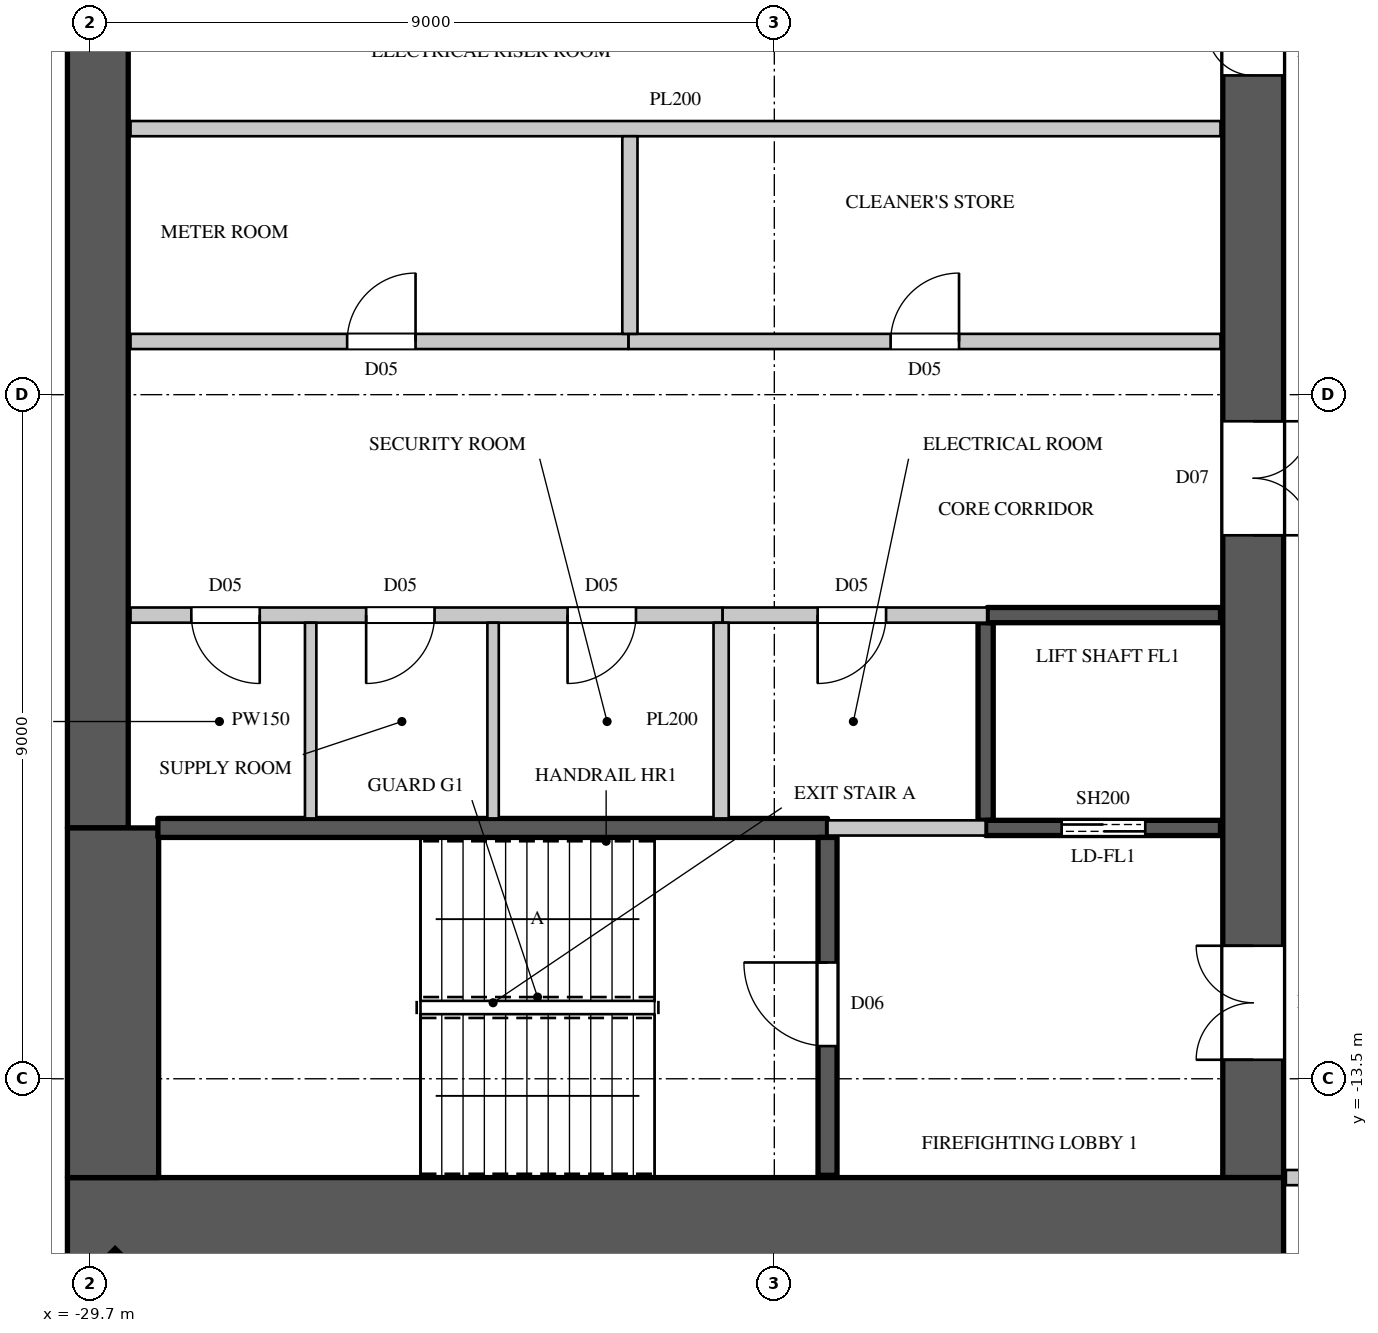
"""IFC4 building model, lengths in metres.
Left out: names, types, materials, properties, quantities, classifications, styles, units other than length and angle.
Written with IfcOpenShell. Run it as: python <this file> out.ifc"""

import sys

from ifc_helpers import new_model, si_unit, direction, frame, frame_2d, origin, origin_2d, place, context, subcontext, project, spatial, rectangle, extrude, element, fill, save


model = new_model("IFC4")
c1 = context("Model", 3, precision=1e-05, world=origin(), true_north=direction((0.0, 1.0)))
c2 = subcontext(c1, "Body", "Model", "MODEL_VIEW")
j1 = project(units=[si_unit("LENGTHUNIT", "METRE"), si_unit("PLANEANGLEUNIT", "RADIAN")], contexts=[c1])
p1 = place(None, origin())
s1 = spatial("IfcSite", under=j1, at=p1, CompositionType="ELEMENT")
p2 = place(p1, origin())
s2 = spatial("IfcBuilding", under=s1, at=p2, CompositionType="ELEMENT")
p3 = place(p2, frame((0.0, 0.0, 164.6)))
s3 = spatial("IfcBuildingStorey", under=s2, at=p3, CompositionType="ELEMENT", Elevation=164.6)
p4 = place(p3, frame((-29.443, -16.443, 0.0), z_axis=(0.0, 0.0, 1.0), x_axis=(0.707106781187, -0.707106781187, 0.0)))
e1 = element("IfcColumn", 1, at=p4, inside=s3, PredefinedType="COLUMN", context=c2, shape_type="SweptSolid", body=[
    extrude(rectangle(XDim=0.9, YDim=1.1, at=origin_2d()), origin(), (0.0, 0.0, 1.0), 4.1),
])
p5 = place(p3, frame((-30.0, -15.4, 0.0), z_axis=(0.0, 0.0, 1.0), x_axis=(1.0, 0.0, 0.0)))
e2 = element("IfcWall", 2, at=p5, inside=s3, PredefinedType="SHEAR", context=c2, shape_type="SweptSolid", body=[
    extrude(rectangle(XDim=16.0, YDim=1.2, at=frame_2d((8.0, 0.0))), origin(), (0.0, 0.0, 1.0), 4.1),
])
p6 = place(p3, frame((-14.4, -14.8, 0.0), z_axis=(0.0, 0.0, 1.0), x_axis=(0.0, 1.0, 0.0)))
e3 = element("IfcWall", 3, at=p6, inside=s3, PredefinedType="SHEAR", context=c2, shape_type="SweptSolid", body=[
    extrude(rectangle(XDim=29.6, YDim=0.8, at=frame_2d((14.8, 0.0))), origin(), (0.0, 0.0, 1.0), 4.1),
])
p7 = place(p6, frame((1.55, 0.0, 0.0)))
e4 = element("IfcOpeningElement", 4, at=p7, cuts=e3, PredefinedType="OPENING", context=c2, shape_type="SweptSolid", body=[
    extrude(rectangle(XDim=1.5, YDim=2.4, at=frame_2d((0.75, 1.2))), frame((0.0, 0.41, 0.0), z_axis=(0.0, -1.0, 0.0), x_axis=(1.0, 0.0, 0.0)), (0.0, 0.0, 1.0), 0.82),
])
p8 = place(p6, frame((26.55, 0.0, 0.0)))
e5 = element("IfcOpeningElement", 5, at=p8, cuts=e3, PredefinedType="OPENING", context=c2, shape_type="SweptSolid", body=[
    extrude(rectangle(XDim=1.5, YDim=2.4, at=frame_2d((0.75, 1.2))), frame((0.0, 0.41, 0.0), z_axis=(0.0, -1.0, 0.0), x_axis=(1.0, 0.0, 0.0)), (0.0, 0.0, 1.0), 0.82),
])
p9 = place(p6, frame((8.45, 0.0, 0.0)))
e6 = element("IfcOpeningElement", 6, at=p9, cuts=e3, PredefinedType="OPENING", context=c2, shape_type="SweptSolid", body=[
    extrude(rectangle(XDim=1.5, YDim=2.4, at=frame_2d((0.75, 1.2))), frame((0.0, 0.41, 0.0), z_axis=(0.0, -1.0, 0.0), x_axis=(1.0, 0.0, 0.0)), (0.0, 0.0, 1.0), 0.82),
])
p10 = place(p6, frame((19.65, 0.0, 0.0)))
e7 = element("IfcOpeningElement", 7, at=p10, cuts=e3, PredefinedType="OPENING", context=c2, shape_type="SweptSolid", body=[
    extrude(rectangle(XDim=1.5, YDim=2.4, at=frame_2d((0.75, 1.2))), frame((0.0, 0.41, 0.0), z_axis=(0.0, -1.0, 0.0), x_axis=(1.0, 0.0, 0.0)), (0.0, 0.0, 1.0), 0.82),
])
p11 = place(p6, frame((14.5, 0.0, 0.0)))
e8 = element("IfcOpeningElement", 8, at=p11, cuts=e3, PredefinedType="OPENING", context=c2, shape_type="SweptSolid", body=[
    extrude(rectangle(XDim=0.6, YDim=2.0, at=frame_2d((0.3, 1.0))), frame((0.0, 0.41, 0.0), z_axis=(0.0, -1.0, 0.0), x_axis=(1.0, 0.0, 0.0)), (0.0, 0.0, 1.0), 0.82),
])
p12 = place(p3, frame((-29.6, -10.2, 0.0), z_axis=(0.0, 0.0, 1.0), x_axis=(0.0, 1.0, 0.0)))
e9 = element("IfcWall", 9, at=p12, inside=s3, PredefinedType="SHEAR", context=c2, shape_type="SweptSolid", body=[
    extrude(rectangle(XDim=20.4, YDim=0.8, at=frame_2d((10.2, 0.0))), origin(), (0.0, 0.0, 1.0), 4.1),
])
p13 = place(p3, frame((-29.4, -14.8, 0.0), z_axis=(0.0, 0.0, 1.0), x_axis=(0.0, 1.0, 0.0)))
e10 = element("IfcWall", 10, at=p13, inside=s3, PredefinedType="SHEAR", context=c2, shape_type="SweptSolid", body=[
    extrude(rectangle(XDim=4.6, YDim=1.2, at=frame_2d((2.3, 0.0))), origin(), (0.0, 0.0, 1.0), 4.1),
])
p14 = place(p3, frame((-29.17, -7.4, 0.0), z_axis=(0.0, 0.0, 1.0), x_axis=(1.0, 0.0, 0.0)))
e11 = element("IfcWall", 11, at=p14, inside=s3, PredefinedType="PARTITIONING", context=c2, shape_type="SweptSolid", body=[
    extrude(rectangle(XDim=7.79, YDim=0.2, at=frame_2d((3.895, 0.0))), origin(), (0.0, 0.0, 1.0), 3.8),
])
p15 = place(p14, frame((0.8, 0.0, 0.0)))
e12 = element("IfcOpeningElement", 12, at=p15, cuts=e11, PredefinedType="OPENING", context=c2, shape_type="SweptSolid", body=[
    extrude(rectangle(XDim=0.9, YDim=2.2, at=frame_2d((0.45, 1.1))), frame((0.0, 0.11, 0.0), z_axis=(0.0, -1.0, 0.0), x_axis=(1.0, 0.0, 0.0)), (0.0, 0.0, 1.0), 0.22),
])
p16 = place(p14, frame((3.1, 0.0, 0.0)))
e13 = element("IfcOpeningElement", 13, at=p16, cuts=e11, PredefinedType="OPENING", context=c2, shape_type="SweptSolid", body=[
    extrude(rectangle(XDim=0.9, YDim=2.2, at=frame_2d((0.45, 1.1))), frame((0.0, 0.11, 0.0), z_axis=(0.0, -1.0, 0.0), x_axis=(1.0, 0.0, 0.0)), (0.0, 0.0, 1.0), 0.22),
])
p17 = place(p14, frame((5.75, 0.0, 0.0)))
e14 = element("IfcOpeningElement", 14, at=p17, cuts=e11, PredefinedType="OPENING", context=c2, shape_type="SweptSolid", body=[
    extrude(rectangle(XDim=0.9, YDim=2.2, at=frame_2d((0.45, 1.1))), frame((0.0, 0.11, 0.0), z_axis=(0.0, -1.0, 0.0), x_axis=(1.0, 0.0, 0.0)), (0.0, 0.0, 1.0), 0.22),
])
p18 = place(p3, frame((-22.62, -3.8, 0.0), z_axis=(0.0, 0.0, 1.0), x_axis=(1.0, 0.0, 0.0)))
e15 = element("IfcWall", 15, at=p18, inside=s3, PredefinedType="PARTITIONING", context=c2, shape_type="SweptSolid", body=[
    extrude(rectangle(XDim=7.79, YDim=0.2, at=frame_2d((3.895, 0.0))), origin(), (0.0, 0.0, 1.0), 3.8),
])
p19 = place(p18, frame((3.45, 0.0, 0.0)))
e16 = element("IfcOpeningElement", 16, at=p19, cuts=e15, PredefinedType="OPENING", context=c2, shape_type="SweptSolid", body=[
    extrude(rectangle(XDim=0.9, YDim=2.2, at=frame_2d((0.45, 1.1))), frame((0.0, 0.11, 0.0), z_axis=(0.0, -1.0, 0.0), x_axis=(1.0, 0.0, 0.0)), (0.0, 0.0, 1.0), 0.22),
])
p20 = place(p3, frame((-13.97, -14.8, 0.0), z_axis=(0.0, 0.0, 1.0), x_axis=(1.0, 0.0, 0.0)))
e17 = element("IfcWall", 17, at=p20, inside=s3, PredefinedType="PARTITIONING", context=c2, shape_type="SweptSolid", body=[
    extrude(rectangle(XDim=2.87, YDim=0.2, at=frame_2d((1.435, 0.0))), origin(), (0.0, 0.0, 1.0), 3.8),
])
for number, where, z_axis, x_axis in (
    (18, (-26.8, -10.075, 0.0), (0.0, 0.0, 1.0), (0.0, 1.0, 0.0)),
    (19, (-24.4, -10.075, 0.0), (0.0, 0.0, 1.0), (0.0, 1.0, 0.0)),
):
    element("IfcWall", number, at=place(p3, frame(where, z_axis=z_axis, x_axis=x_axis)), inside=s3, PredefinedType="PARTITIONING", context=c2, shape_type="SweptSolid", body=[
        extrude(rectangle(XDim=2.575, YDim=0.15, at=frame_2d((1.288, 0.0))), origin(), (0.0, 0.0, 1.0), 3.8),
    ])
p21 = place(p3, frame((-29.17, -3.8, 0.0), z_axis=(0.0, 0.0, 1.0), x_axis=(1.0, 0.0, 0.0)))
e20 = element("IfcWall", 20, at=p21, inside=s3, PredefinedType="PARTITIONING", context=c2, shape_type="SweptSolid", body=[
    extrude(rectangle(XDim=6.55, YDim=0.2, at=frame_2d((3.275, 0.0))), origin(), (0.0, 0.0, 1.0), 3.8),
])
p22 = place(p21, frame((2.85, 0.0, 0.0)))
e21 = element("IfcOpeningElement", 21, at=p22, cuts=e20, PredefinedType="OPENING", context=c2, shape_type="SweptSolid", body=[
    extrude(rectangle(XDim=0.9, YDim=2.2, at=frame_2d((0.45, 1.1))), frame((0.0, 0.11, 0.0), z_axis=(0.0, -1.0, 0.0), x_axis=(1.0, 0.0, 0.0)), (0.0, 0.0, 1.0), 0.22),
])
p23 = place(p3, frame((-29.17, -1.0, 0.0), z_axis=(0.0, 0.0, 1.0), x_axis=(1.0, 0.0, 0.0)))
e22 = element("IfcWall", 22, at=p23, inside=s3, PredefinedType="PARTITIONING", context=c2, shape_type="SweptSolid", body=[
    extrude(rectangle(XDim=14.34, YDim=0.2, at=frame_2d((7.17, 0.0))), origin(), (0.0, 0.0, 1.0), 3.8),
])
p24 = place(p3, frame((-22.6, -3.7, 0.0), z_axis=(0.0, 0.0, 1.0), x_axis=(0.0, 1.0, 0.0)))
e23 = element("IfcWall", 23, at=p24, inside=s3, PredefinedType="PARTITIONING", context=c2, shape_type="SweptSolid", body=[
    extrude(rectangle(XDim=2.6, YDim=0.2, at=frame_2d((1.3, 0.0))), origin(), (0.0, 0.0, 1.0), 3.8),
])
p25 = place(p3, frame((-21.38, -7.4, 0.0), z_axis=(0.0, 0.0, 1.0), x_axis=(1.0, 0.0, 0.0)))
e24 = element("IfcWall", 24, at=p25, inside=s3, PredefinedType="PARTITIONING", context=c2, shape_type="SweptSolid", body=[
    extrude(rectangle(XDim=3.48, YDim=0.2, at=frame_2d((1.74, 0.0))), origin(), (0.0, 0.0, 1.0), 3.8),
])
p26 = place(p25, frame((1.25, 0.0, 0.0)))
e25 = element("IfcOpeningElement", 25, at=p26, cuts=e24, PredefinedType="OPENING", context=c2, shape_type="SweptSolid", body=[
    extrude(rectangle(XDim=0.9, YDim=2.2, at=frame_2d((0.45, 1.1))), frame((0.0, 0.11, 0.0), z_axis=(0.0, -1.0, 0.0), x_axis=(1.0, 0.0, 0.0)), (0.0, 0.0, 1.0), 0.22),
])
p27 = place(p3, frame((-21.4, -10.075, 0.0), z_axis=(0.0, 0.0, 1.0), x_axis=(0.0, 1.0, 0.0)))
e26 = element("IfcWall", 26, at=p27, inside=s3, PredefinedType="PARTITIONING", context=c2, shape_type="SweptSolid", body=[
    extrude(rectangle(XDim=2.575, YDim=0.2, at=frame_2d((1.288, 0.0))), origin(), (0.0, 0.0, 1.0), 3.8),
])
p28 = place(p3, frame((-20.0, -10.2, 0.0), z_axis=(0.0, 0.0, 1.0), x_axis=(1.0, 0.0, 0.0)))
e27 = element("IfcWall", 27, at=p28, inside=s3, PredefinedType="PARTITIONING", context=c2, shape_type="SweptSolid", body=[
    extrude(rectangle(XDim=2.08, YDim=0.2, at=frame_2d((1.04, 0.0))), origin(), (0.0, 0.0, 1.0), 3.8),
])
p29 = place(p3, frame((-17.92, -10.1, 0.0), z_axis=(0.0, 0.0, 1.0), x_axis=(0.0, 1.0, 0.0)))
e28 = element("IfcWall", 28, at=p29, inside=s3, PredefinedType="SHEAR", context=c2, shape_type="SweptSolid", body=[
    extrude(rectangle(XDim=2.6, YDim=0.2, at=frame_2d((1.3, 0.0))), origin(), (0.0, 0.0, 1.0), 3.8),
])
p30 = place(p3, frame((-17.92, -10.2, 0.0), z_axis=(0.0, 0.0, 1.0), x_axis=(1.0, 0.0, 0.0)))
e29 = element("IfcWall", 29, at=p30, inside=s3, PredefinedType="SHEAR", context=c2, shape_type="SweptSolid", body=[
    extrude(rectangle(XDim=3.09, YDim=0.2, at=frame_2d((1.545, 0.0))), origin(), (0.0, 0.0, 1.0), 3.8),
])
p31 = place(p30, frame((1.0, 0.0, 0.0)))
e30 = element("IfcOpeningElement", 30, at=p31, cuts=e29, PredefinedType="OPENING", context=c2, shape_type="SweptSolid", body=[
    extrude(rectangle(XDim=1.1, YDim=2.2, at=frame_2d((0.55, 1.1))), frame((0.0, 0.11, 0.0), z_axis=(0.0, -1.0, 0.0), x_axis=(1.0, 0.0, 0.0)), (0.0, 0.0, 1.0), 0.22),
])
p32 = place(p3, frame((-17.9, -7.4, 0.0), z_axis=(0.0, 0.0, 1.0), x_axis=(1.0, 0.0, 0.0)))
e31 = element("IfcWall", 31, at=p32, inside=s3, PredefinedType="SHEAR", context=c2, shape_type="SweptSolid", body=[
    extrude(rectangle(XDim=3.07, YDim=0.2, at=frame_2d((1.535, 0.0))), origin(), (0.0, 0.0, 1.0), 3.8),
])
p33 = place(p3, frame((-28.81, -10.2, 0.0), z_axis=(0.0, 0.0, 1.0), x_axis=(1.0, 0.0, 0.0)))
e32 = element("IfcWall", 32, at=p33, inside=s3, PredefinedType="SHEAR", context=c2, shape_type="SweptSolid", body=[
    extrude(rectangle(XDim=8.81, YDim=0.25, at=frame_2d((4.405, 0.0))), origin(), (0.0, 0.0, 1.0), 3.8),
])
p34 = place(p3, frame((-20.0, -14.77, 0.0), z_axis=(0.0, 0.0, 1.0), x_axis=(0.0, 1.0, 0.0)))
e33 = element("IfcWall", 33, at=p34, inside=s3, PredefinedType="SHEAR", context=c2, shape_type="SweptSolid", body=[
    extrude(rectangle(XDim=4.445, YDim=0.25, at=frame_2d((2.223, 0.0))), origin(), (0.0, 0.0, 1.0), 3.8),
])
p35 = place(p34, frame((1.7, 0.0, 0.0)))
e34 = element("IfcOpeningElement", 34, at=p35, cuts=e33, PredefinedType="OPENING", context=c2, shape_type="SweptSolid", body=[
    extrude(rectangle(XDim=1.1, YDim=2.2, at=frame_2d((0.55, 1.1))), frame((0.0, 0.135, 0.0), z_axis=(0.0, -1.0, 0.0), x_axis=(1.0, 0.0, 0.0)), (0.0, 0.0, 1.0), 0.27),
])
p36 = place(p35, origin())
e35 = element("IfcDoor", 35, at=p36, inside=s3, OperationType="SINGLE_SWING_RIGHT", PredefinedType="DOOR", context=c2, shape_type="SweptSolid", body=[
    extrude(rectangle(XDim=1.1, YDim=2.2, at=frame_2d((0.55, 1.1))), frame((0.0, 0.025, 0.0), z_axis=(0.0, -1.0, 0.0), x_axis=(1.0, 0.0, 0.0)), (0.0, 0.0, 1.0), 0.05),
])
fill(e34, e35)
p37 = place(p15, origin())
e36 = element("IfcDoor", 36, at=p37, inside=s3, OperationType="SINGLE_SWING_LEFT", PredefinedType="DOOR", context=c2, shape_type="SweptSolid", body=[
    extrude(rectangle(XDim=0.9, YDim=2.2, at=frame_2d((0.45, 1.1))), frame((0.0, 0.025, 0.0), z_axis=(0.0, -1.0, 0.0), x_axis=(1.0, 0.0, 0.0)), (0.0, 0.0, 1.0), 0.05),
])
fill(e12, e36)
p38 = place(p16, origin())
e37 = element("IfcDoor", 37, at=p38, inside=s3, OperationType="SINGLE_SWING_RIGHT", PredefinedType="DOOR", context=c2, shape_type="SweptSolid", body=[
    extrude(rectangle(XDim=0.9, YDim=2.2, at=frame_2d((0.45, 1.1))), frame((0.0, 0.025, 0.0), z_axis=(0.0, -1.0, 0.0), x_axis=(1.0, 0.0, 0.0)), (0.0, 0.0, 1.0), 0.05),
])
fill(e13, e37)
p39 = place(p17, origin())
e38 = element("IfcDoor", 38, at=p39, inside=s3, OperationType="SINGLE_SWING_RIGHT", PredefinedType="DOOR", context=c2, shape_type="SweptSolid", body=[
    extrude(rectangle(XDim=0.9, YDim=2.2, at=frame_2d((0.45, 1.1))), frame((0.0, 0.025, 0.0), z_axis=(0.0, -1.0, 0.0), x_axis=(1.0, 0.0, 0.0)), (0.0, 0.0, 1.0), 0.05),
])
fill(e14, e38)
p40 = place(p26, origin())
e39 = element("IfcDoor", 39, at=p40, inside=s3, OperationType="SINGLE_SWING_RIGHT", PredefinedType="DOOR", context=c2, shape_type="SweptSolid", body=[
    extrude(rectangle(XDim=0.9, YDim=2.2, at=frame_2d((0.45, 1.1))), frame((0.0, 0.025, 0.0), z_axis=(0.0, -1.0, 0.0), x_axis=(1.0, 0.0, 0.0)), (0.0, 0.0, 1.0), 0.05),
])
fill(e25, e39)
p41 = place(p22, origin())
e40 = element("IfcDoor", 40, at=p41, inside=s3, OperationType="SINGLE_SWING_RIGHT", PredefinedType="DOOR", context=c2, shape_type="SweptSolid", body=[
    extrude(rectangle(XDim=0.9, YDim=2.2, at=frame_2d((0.45, 1.1))), frame((0.0, 0.025, 0.0), z_axis=(0.0, -1.0, 0.0), x_axis=(1.0, 0.0, 0.0)), (0.0, 0.0, 1.0), 0.05),
])
fill(e21, e40)
p42 = place(p19, origin())
e41 = element("IfcDoor", 41, at=p42, inside=s3, OperationType="SINGLE_SWING_RIGHT", PredefinedType="DOOR", context=c2, shape_type="SweptSolid", body=[
    extrude(rectangle(XDim=0.9, YDim=2.2, at=frame_2d((0.45, 1.1))), frame((0.0, 0.025, 0.0), z_axis=(0.0, -1.0, 0.0), x_axis=(1.0, 0.0, 0.0)), (0.0, 0.0, 1.0), 0.05),
])
fill(e16, e41)
p43 = place(p31, origin())
e42 = element("IfcDoor", 42, at=p43, inside=s3, OperationType="DOUBLE_DOOR_SLIDING", PredefinedType="DOOR", context=c2, shape_type="SweptSolid", body=[
    extrude(rectangle(XDim=1.1, YDim=2.2, at=frame_2d((0.55, 1.1))), frame((0.0, 0.025, 0.0), z_axis=(0.0, -1.0, 0.0), x_axis=(1.0, 0.0, 0.0)), (0.0, 0.0, 1.0), 0.05),
])
fill(e30, e42)
p44 = place(p7, origin())
e43 = element("IfcDoor", 43, at=p44, inside=s3, OperationType="DOUBLE_DOOR_SINGLE_SWING", PredefinedType="DOOR", context=c2, shape_type="SweptSolid", body=[
    extrude(rectangle(XDim=1.5, YDim=2.4, at=frame_2d((0.75, 1.2))), frame((0.0, 0.395, 0.0), z_axis=(0.0, -1.0, 0.0), x_axis=(1.0, 0.0, 0.0)), (0.0, 0.0, 1.0), 0.05),
])
fill(e4, e43)
p45 = place(p9, origin())
e44 = element("IfcDoor", 44, at=p45, inside=s3, OperationType="DOUBLE_DOOR_SINGLE_SWING", PredefinedType="DOOR", context=c2, shape_type="SweptSolid", body=[
    extrude(rectangle(XDim=1.5, YDim=2.4, at=frame_2d((0.75, 1.2))), frame((0.0, -0.345, 0.0), z_axis=(0.0, -1.0, 0.0), x_axis=(1.0, 0.0, 0.0)), (0.0, 0.0, 1.0), 0.05),
])
fill(e6, e44)
p46 = place(p11, origin())
e45 = element("IfcDoor", 45, at=p46, inside=s3, OperationType="SINGLE_SWING_RIGHT", PredefinedType="DOOR", context=c2, shape_type="SweptSolid", body=[
    extrude(rectangle(XDim=0.6, YDim=2.0, at=frame_2d((0.3, 1.0))), frame((0.0, 0.395, 0.0), z_axis=(0.0, -1.0, 0.0), x_axis=(1.0, 0.0, 0.0)), (0.0, 0.0, 1.0), 0.05),
])
fill(e8, e45)
save(model, sys.argv[1])
